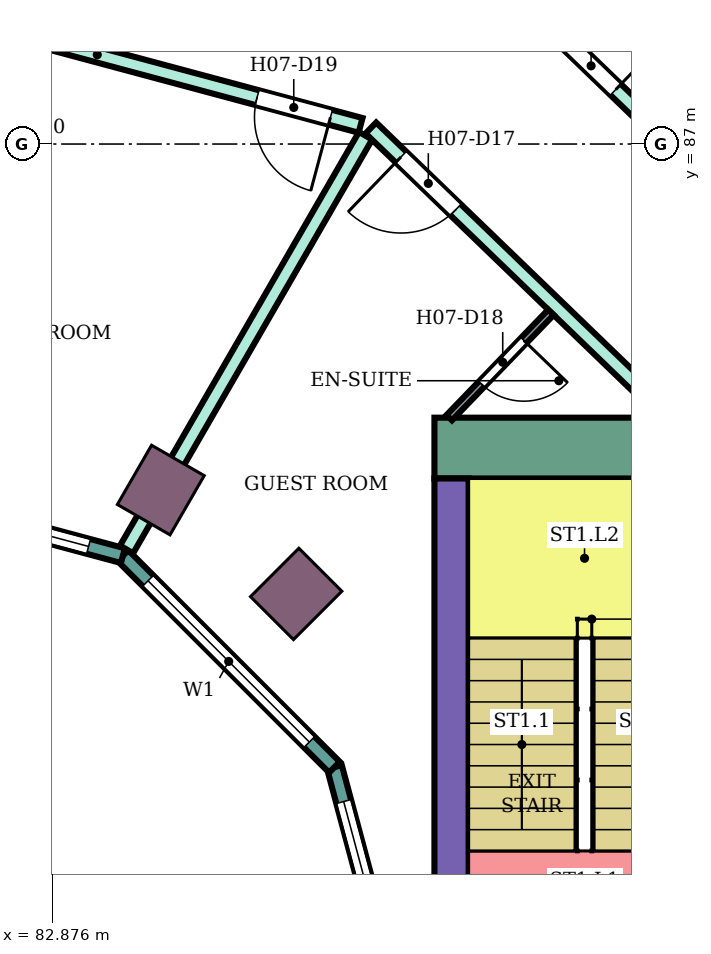
"""IFC4 building model, lengths in metres.
Left out: names, types, materials, properties, quantities, classifications, styles, units other than length and angle.
Written with IfcOpenShell. Run it as: python <this file> out.ifc"""

import sys

from ifc_helpers import new_model, si_unit, direction, frame, frame_2d, origin, origin_2d, place, context, subcontext, project, spatial, rectangle, extrude, element, fill, save


model = new_model("IFC4")
c1 = context("Model", 3, precision=1e-05, world=origin(), true_north=direction((0.0, 1.0)))
c2 = subcontext(c1, "Body", "Model", "MODEL_VIEW")
j1 = project(units=[si_unit("LENGTHUNIT", "METRE"), si_unit("PLANEANGLEUNIT", "RADIAN")], contexts=[c1])
p1 = place(None, origin())
s1 = spatial("IfcSite", under=j1, at=p1, CompositionType="ELEMENT")
p2 = place(p1, origin())
s2 = spatial("IfcBuilding", under=s1, at=p2, CompositionType="ELEMENT")
p3 = place(p2, frame((0.0, 0.0, 105.2)))
s3 = spatial("IfcBuildingStorey", under=s2, at=p3, CompositionType="ELEMENT", Elevation=105.2)
for number, where, z_axis, x_axis in (
    (1, (86.081, 81.081, 0.0), (0.0, 0.0, 1.0), (0.707, 0.707, 0.0)),
    (2, (84.3, 82.448, 0.0), (0.0, 0.0, 1.0), (0.5, 0.866, 0.0)),
):
    element("IfcColumn", number, at=place(p3, frame(where, z_axis=z_axis, x_axis=x_axis)), inside=s3, PredefinedType="COLUMN", context=c2, shape_type="SweptSolid", body=[
        extrude(rectangle(XDim=0.9, YDim=0.8, at=origin_2d()), origin(), (0.0, 0.0, 1.0), 3.8),
    ])
p4 = place(p3, frame((87.9, 83.0, 0.0), z_axis=(0.0, 0.0, 1.0), x_axis=(1.0, 0.0, 0.0)))
e3 = element("IfcWall", 3, at=p4, inside=s3, PredefinedType="SHEAR", context=c2, shape_type="SweptSolid", body=[
    extrude(rectangle(XDim=14.7, YDim=0.8, at=frame_2d((7.35, 0.0))), origin(), (0.0, 0.0, 1.0), 3.45),
])
p5 = place(p4, frame((4.2, 0.0, 0.0)))
e4 = element("IfcOpeningElement", 4, at=p5, cuts=e3, PredefinedType="OPENING", context=c2, shape_type="SweptSolid", body=[
    extrude(rectangle(XDim=2.4, YDim=2.4, at=frame_2d((1.2, 1.2))), frame((0.0, 0.41, 0.0), z_axis=(0.0, -1.0, 0.0), x_axis=(1.0, 0.0, 0.0)), (0.0, 0.0, 1.0), 0.82),
])
p6 = place(p3, frame((88.125, 75.0, 0.0), z_axis=(0.0, 0.0, 1.0), x_axis=(0.0, 1.0, 0.0)))
e5 = element("IfcWall", 5, at=p6, inside=s3, PredefinedType="SHEAR", context=c2, shape_type="SweptSolid", body=[
    extrude(rectangle(XDim=7.6, YDim=0.45, at=frame_2d((3.8, 0.0))), origin(), (0.0, 0.0, 1.0), 3.45),
])
p7 = place(p3, frame((87.604, 75.0, 0.0), z_axis=(0.0, 0.0, 1.0), x_axis=(-0.258789828301, 0.965933654434, 0.0)))
e6 = element("IfcWall", 6, at=p7, inside=s3, PredefinedType="NOTDEFINED", context=c2, shape_type="SweptSolid", body=[
    extrude(rectangle(XDim=3.936, YDim=0.2, at=frame_2d((1.968, 0.0))), origin(), (0.0, 0.0, 1.0), 3.8),
])
p8 = place(p7, frame((0.468, 0.0, 0.9)))
e7 = element("IfcOpeningElement", 7, at=p8, cuts=e6, PredefinedType="OPENING", context=c2, shape_type="SweptSolid", body=[
    extrude(rectangle(XDim=3.0, YDim=2.3, at=frame_2d((1.5, 1.15))), frame((0.0, 0.11, 0.0), z_axis=(0.0, -1.0, 0.0), x_axis=(1.0, 0.0, 0.0)), (0.0, 0.0, 1.0), 0.22),
])
p9 = place(p3, frame((86.585, 78.802, 0.0), z_axis=(0.0, 0.0, 1.0), x_axis=(-0.707106781187, 0.707106781187, 0.0)))
e8 = element("IfcWall", 8, at=p9, inside=s3, PredefinedType="NOTDEFINED", context=c2, shape_type="SweptSolid", body=[
    extrude(rectangle(XDim=3.936, YDim=0.2, at=frame_2d((1.968, 0.0))), origin(), (0.0, 0.0, 1.0), 3.8),
])
p10 = place(p9, frame((0.468, 0.0, 0.9)))
e9 = element("IfcOpeningElement", 9, at=p10, cuts=e8, PredefinedType="OPENING", context=c2, shape_type="SweptSolid", body=[
    extrude(rectangle(XDim=3.0, YDim=2.3, at=frame_2d((1.5, 1.15))), frame((0.0, 0.11, 0.0), z_axis=(0.0, -1.0, 0.0), x_axis=(1.0, 0.0, 0.0)), (0.0, 0.0, 1.0), 0.22),
])
p11 = place(p3, frame((83.802, 81.585, 0.0), z_axis=(0.0, 0.0, 1.0), x_axis=(-0.965933654434, 0.258789828301, 0.0)))
e10 = element("IfcWall", 10, at=p11, inside=s3, PredefinedType="NOTDEFINED", context=c2, shape_type="SweptSolid", body=[
    extrude(rectangle(XDim=3.936, YDim=0.2, at=frame_2d((1.968, 0.0))), origin(), (0.0, 0.0, 1.0), 3.8),
])
p12 = place(p11, frame((0.468, 0.0, 0.9)))
e11 = element("IfcOpeningElement", 11, at=p12, cuts=e10, PredefinedType="OPENING", context=c2, shape_type="SweptSolid", body=[
    extrude(rectangle(XDim=3.0, YDim=2.3, at=frame_2d((1.5, 1.15))), frame((0.0, 0.11, 0.0), z_axis=(0.0, -1.0, 0.0), x_axis=(1.0, 0.0, 0.0)), (0.0, 0.0, 1.0), 0.22),
])
p13 = place(p3, frame((80.0, 89.104, 0.0), z_axis=(0.0, 0.0, 1.0), x_axis=(0.965856548257, -0.259077455964, 0.0)))
e12 = element("IfcWall", 12, at=p13, inside=s3, PredefinedType="PARTITIONING", context=c2, shape_type="SweptSolid", body=[
    extrude(rectangle(XDim=7.173, YDim=0.2, at=frame_2d((3.586, 0.0))), origin(), (0.0, 0.0, 1.0), 3.35),
])
p14 = place(p13, frame((5.763, 0.0, 0.0)))
e13 = element("IfcOpeningElement", 13, at=p14, cuts=e12, PredefinedType="OPENING", context=c2, shape_type="SweptSolid", body=[
    extrude(rectangle(XDim=1.0, YDim=2.1, at=frame_2d((0.5, 1.05))), frame((0.0, 0.11, 0.0), z_axis=(0.0, -1.0, 0.0), x_axis=(1.0, 0.0, 0.0)), (0.0, 0.0, 1.0), 0.22),
])
p15 = place(p3, frame((83.85, 81.667, 0.0), z_axis=(0.0, 0.0, 1.0), x_axis=(0.500224530691, 0.865895732115, 0.0)))
e14 = element("IfcWall", 14, at=p15, inside=s3, PredefinedType="PARTITIONING", context=c2, shape_type="SweptSolid", body=[
    extrude(rectangle(XDim=6.285, YDim=0.2, at=frame_2d((3.143, 0.0))), origin(), (0.0, 0.0, 1.0), 3.35),
])
p16 = place(p3, frame((87.064, 87.211, 0.0), z_axis=(0.0, 0.0, 1.0), x_axis=(0.719540958932, -0.694450004262, 0.0)))
e15 = element("IfcWall", 15, at=p16, inside=s3, PredefinedType="PARTITIONING", context=c2, shape_type="SweptSolid", body=[
    extrude(rectangle(XDim=5.488, YDim=0.2, at=frame_2d((2.744, 0.0))), origin(), (0.0, 0.0, 1.0), 3.35),
])
p17 = place(p16, frame((0.55, 0.0, 0.0)))
e16 = element("IfcOpeningElement", 16, at=p17, cuts=e15, PredefinedType="OPENING", context=c2, shape_type="SweptSolid", body=[
    extrude(rectangle(XDim=1.0, YDim=2.1, at=frame_2d((0.5, 1.05))), frame((0.0, 0.11, 0.0), z_axis=(0.0, -1.0, 0.0), x_axis=(1.0, 0.0, 0.0)), (0.0, 0.0, 1.0), 0.22),
])
p18 = place(p3, frame((88.465, 89.473, 0.0), z_axis=(0.0, 0.0, 1.0), x_axis=(0.719531044682, -0.694460276574, 0.0)))
e17 = element("IfcWall", 17, at=p18, inside=s3, PredefinedType="PARTITIONING", context=c2, shape_type="SweptSolid", body=[
    extrude(rectangle(XDim=6.524, YDim=0.2, at=frame_2d((3.262, 0.0))), origin(), (0.0, 0.0, 1.0), 3.35),
])
p19 = place(p18, frame((1.629, 0.0, 0.0)))
e18 = element("IfcOpeningElement", 18, at=p19, cuts=e17, PredefinedType="OPENING", context=c2, shape_type="SweptSolid", body=[
    extrude(rectangle(XDim=0.9, YDim=2.1, at=frame_2d((0.45, 1.05))), frame((0.0, 0.11, 0.0), z_axis=(0.0, -1.0, 0.0), x_axis=(1.0, 0.0, 0.0)), (0.0, 0.0, 1.0), 0.22),
])
p20 = place(p3, frame((88.095, 83.4, 0.0), z_axis=(0.0, 0.0, 1.0), x_axis=(0.694447472534, 0.719543402368, 0.0)))
e19 = element("IfcWall", 19, at=p20, inside=s3, PredefinedType="PARTITIONING", context=c2, shape_type="SweptSolid", body=[
    extrude(rectangle(XDim=1.926, YDim=0.1, at=frame_2d((0.963, 0.0))), origin(), (0.0, 0.0, 1.0), 3.35),
])
p21 = place(p20, frame((0.613, 0.0, 0.0)))
e20 = element("IfcOpeningElement", 20, at=p21, cuts=e19, PredefinedType="OPENING", context=c2, shape_type="SweptSolid", body=[
    extrude(rectangle(XDim=0.8, YDim=2.1, at=frame_2d((0.4, 1.05))), frame((0.0, 0.06, 0.0), z_axis=(0.0, -1.0, 0.0), x_axis=(1.0, 0.0, 0.0)), (0.0, 0.0, 1.0), 0.12),
])
p22 = place(p8, origin())
e21 = element("IfcWindow", 21, at=p22, inside=s3, PartitioningType="SINGLE_PANEL", PredefinedType="WINDOW", context=c2, shape_type="SweptSolid", body=[
    extrude(rectangle(XDim=3.0, YDim=2.3, at=frame_2d((1.5, 1.15))), frame((0.0, 0.03, 0.0), z_axis=(0.0, -1.0, 0.0), x_axis=(1.0, 0.0, 0.0)), (0.0, 0.0, 1.0), 0.06),
])
fill(e7, e21)
p23 = place(p10, origin())
e22 = element("IfcWindow", 22, at=p23, inside=s3, PartitioningType="SINGLE_PANEL", PredefinedType="WINDOW", context=c2, shape_type="SweptSolid", body=[
    extrude(rectangle(XDim=3.0, YDim=2.3, at=frame_2d((1.5, 1.15))), frame((0.0, 0.03, 0.0), z_axis=(0.0, -1.0, 0.0), x_axis=(1.0, 0.0, 0.0)), (0.0, 0.0, 1.0), 0.06),
])
fill(e9, e22)
p24 = place(p12, origin())
e23 = element("IfcWindow", 23, at=p24, inside=s3, PartitioningType="SINGLE_PANEL", PredefinedType="WINDOW", context=c2, shape_type="SweptSolid", body=[
    extrude(rectangle(XDim=3.0, YDim=2.3, at=frame_2d((1.5, 1.15))), frame((0.0, 0.03, 0.0), z_axis=(0.0, -1.0, 0.0), x_axis=(1.0, 0.0, 0.0)), (0.0, 0.0, 1.0), 0.06),
])
fill(e11, e23)
p25 = place(p19, origin())
e24 = element("IfcDoor", 24, at=p25, inside=s3, OperationType="SINGLE_SWING_RIGHT", PredefinedType="DOOR", context=c2, shape_type="SweptSolid", body=[
    extrude(rectangle(XDim=0.9, YDim=2.1, at=frame_2d((0.45, 1.05))), frame((0.0, 0.025, 0.0), z_axis=(0.0, -1.0, 0.0), x_axis=(1.0, 0.0, 0.0)), (0.0, 0.0, 1.0), 0.05),
])
fill(e18, e24)
p26 = place(p17, frame((1.0, 0.0, 0.0), z_axis=(0.0, 0.0, 1.0), x_axis=(-1.0, 0.0, 0.0)))
e25 = element("IfcDoor", 25, at=p26, inside=s3, OperationType="SINGLE_SWING_RIGHT", PredefinedType="DOOR", context=c2, shape_type="SweptSolid", body=[
    extrude(rectangle(XDim=1.0, YDim=2.1, at=frame_2d((0.5, 1.05))), frame((0.0, 0.025, 0.0), z_axis=(0.0, -1.0, 0.0), x_axis=(1.0, 0.0, 0.0)), (0.0, 0.0, 1.0), 0.05),
])
fill(e16, e25)
p27 = place(p21, frame((0.8, 0.0, 0.0), z_axis=(0.0, 0.0, 1.0), x_axis=(-1.0, 0.0, 0.0)))
e26 = element("IfcDoor", 26, at=p27, inside=s3, OperationType="SINGLE_SWING_LEFT", PredefinedType="DOOR", context=c2, shape_type="SweptSolid", body=[
    extrude(rectangle(XDim=0.8, YDim=2.1, at=frame_2d((0.4, 1.05))), frame((0.0, 0.025, 0.0), z_axis=(0.0, -1.0, 0.0), x_axis=(1.0, 0.0, 0.0)), (0.0, 0.0, 1.0), 0.05),
])
fill(e20, e26)
p28 = place(p14, frame((1.0, 0.0, 0.0), z_axis=(0.0, 0.0, 1.0), x_axis=(-1.0, 0.0, 0.0)))
e27 = element("IfcDoor", 27, at=p28, inside=s3, OperationType="SINGLE_SWING_LEFT", PredefinedType="DOOR", context=c2, shape_type="SweptSolid", body=[
    extrude(rectangle(XDim=1.0, YDim=2.1, at=frame_2d((0.5, 1.05))), frame((0.0, 0.025, 0.0), z_axis=(0.0, -1.0, 0.0), x_axis=(1.0, 0.0, 0.0)), (0.0, 0.0, 1.0), 0.05),
])
fill(e13, e27)
save(model, sys.argv[1])
